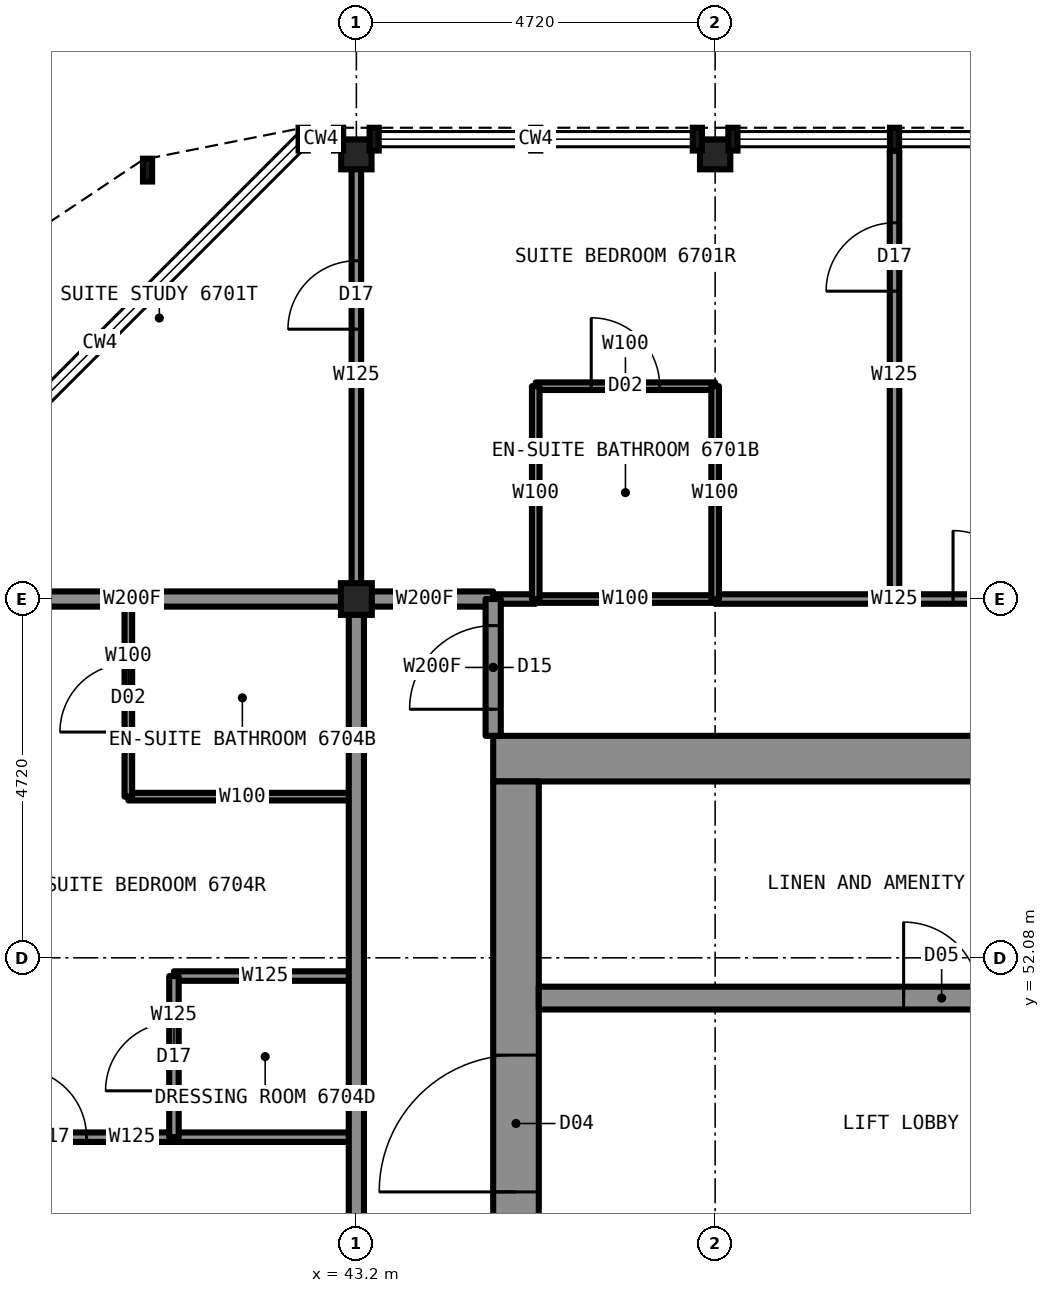
"""IFC4 building model, lengths in metres.
Left out: names, types, materials, properties, quantities, classifications, styles, units other than length and angle.
Written with IfcOpenShell. Run it as: python <this file> out.ifc"""

import sys

from ifc_helpers import new_model, si_unit, direction, frame, frame_2d, origin, origin_2d, place, context, subcontext, project, spatial, rectangle, i_section, extrude, element, fill, save


model = new_model("IFC4")
c1 = context("Model", 3, precision=1e-05, world=origin(), true_north=direction((0.0, 1.0)))
c2 = subcontext(c1, "Body", "Model", "MODEL_VIEW")
j1 = project(units=[si_unit("LENGTHUNIT", "METRE"), si_unit("PLANEANGLEUNIT", "RADIAN")], contexts=[c1])
p1 = place(None, origin())
s1 = spatial("IfcSite", under=j1, at=p1, CompositionType="ELEMENT")
p2 = place(p1, origin())
s2 = spatial("IfcBuilding", under=s1, at=p2, CompositionType="ELEMENT")
p3 = place(p2, frame((0.0, 0.0, 247.7)))
s3 = spatial("IfcBuildingStorey", under=s2, at=p3, CompositionType="ELEMENT", Elevation=247.7)
for number, where, z_axis, x_axis in (
    (1, (43.2, 62.65, 0.0), (0.0, 0.0, 1.0), (1.0, 0.0, 0.0)),
    (2, (47.92, 62.65, 0.0), (0.0, 0.0, 1.0), (1.0, 0.0, 0.0)),
):
    element("IfcColumn", number, at=place(p3, frame(where, z_axis=z_axis, x_axis=x_axis)), inside=s3, PredefinedType="COLUMN", context=c2, shape_type="SweptSolid", body=[
        extrude(i_section(OverallWidth=0.399, OverallDepth=0.394, WebThickness=0.023, FlangeThickness=0.037, at=origin_2d()), origin(), (0.0, 0.0, 1.0), 3.5),
    ])
p4 = place(p3, frame((43.2, 56.8, 0.0), z_axis=(0.0, 0.0, 1.0), x_axis=(1.0, 0.0, 0.0)))
e3 = element("IfcColumn", 3, at=p4, inside=s3, PredefinedType="COLUMN", context=c2, shape_type="SweptSolid", body=[
    extrude(i_section(OverallWidth=0.406, OverallDepth=0.417, WebThickness=0.03, FlangeThickness=0.048, at=origin_2d()), origin(), (0.0, 0.0, 1.0), 3.5),
])
p5 = place(p3, frame((45.0, 54.7, 0.0), z_axis=(0.0, 0.0, 1.0), x_axis=(1.0, 0.0, 0.0)))
e4 = element("IfcWall", 4, at=p5, inside=s3, PredefinedType="SHEAR", context=c2, shape_type="SweptSolid", body=[
    extrude(rectangle(XDim=20.0, YDim=0.6, at=frame_2d((10.0, 0.0))), origin(), (0.0, 0.0, 1.0), 3.5),
])
p6 = place(p3, frame((45.3, 35.6, 0.0), z_axis=(0.0, 0.0, 1.0), x_axis=(0.0, 1.0, 0.0)))
e5 = element("IfcWall", 5, at=p6, inside=s3, PredefinedType="SHEAR", context=c2, shape_type="SweptSolid", body=[
    extrude(rectangle(XDim=18.8, YDim=0.6, at=frame_2d((9.4, 0.0))), origin(), (0.0, 0.0, 1.0), 3.5),
])
p7 = place(p6, frame((13.4, 0.0, 0.0)))
e6 = element("IfcOpeningElement", 6, at=p7, cuts=e5, PredefinedType="OPENING", context=c2, shape_type="SweptSolid", body=[
    extrude(rectangle(XDim=1.8, YDim=2.2, at=frame_2d((0.9, 1.1))), frame((0.0, 0.31, 0.0), z_axis=(0.0, -1.0, 0.0), x_axis=(1.0, 0.0, 0.0)), (0.0, 0.0, 1.0), 0.62),
])
p8 = place(p6, frame((3.6, 0.0, 0.0)))
e7 = element("IfcOpeningElement", 7, at=p8, cuts=e5, PredefinedType="OPENING", context=c2, shape_type="SweptSolid", body=[
    extrude(rectangle(XDim=1.8, YDim=2.2, at=frame_2d((0.9, 1.1))), frame((0.0, 0.31, 0.0), z_axis=(0.0, -1.0, 0.0), x_axis=(1.0, 0.0, 0.0)), (0.0, 0.0, 1.0), 0.62),
])
p9 = place(p6, frame((6.4, 0.0, 0.0)))
e8 = element("IfcOpeningElement", 8, at=p9, cuts=e5, PredefinedType="OPENING", context=c2, shape_type="SweptSolid", body=[
    extrude(rectangle(XDim=1.2, YDim=2.2, at=frame_2d((0.6, 1.1))), frame((0.0, 0.31, 0.0), z_axis=(0.0, -1.0, 0.0), x_axis=(1.0, 0.0, 0.0)), (0.0, 0.0, 1.0), 0.62),
])
p10 = place(p3, frame((45.6, 51.55, 0.0), z_axis=(0.0, 0.0, 1.0), x_axis=(1.0, 0.0, 0.0)))
e9 = element("IfcWall", 9, at=p10, inside=s3, PredefinedType="SHEAR", context=c2, shape_type="SweptSolid", body=[
    extrude(rectangle(XDim=18.8, YDim=0.3, at=frame_2d((9.4, 0.0))), origin(), (0.0, 0.0, 1.0), 3.5),
])
p11 = place(p10, frame((4.8, 0.0, 0.0)))
e10 = element("IfcOpeningElement", 10, at=p11, cuts=e9, PredefinedType="OPENING", context=c2, shape_type="SweptSolid", body=[
    extrude(rectangle(XDim=1.0, YDim=2.1, at=frame_2d((0.5, 1.05))), frame((0.0, 0.16, 0.0), z_axis=(0.0, -1.0, 0.0), x_axis=(1.0, 0.0, 0.0)), (0.0, 0.0, 1.0), 0.32),
])
p12 = place(p10, frame((11.6, 0.0, 0.0)))
e11 = element("IfcOpeningElement", 11, at=p12, cuts=e9, PredefinedType="OPENING", context=c2, shape_type="SweptSolid", body=[
    extrude(rectangle(XDim=1.1, YDim=2.2, at=frame_2d((0.55, 1.1))), frame((0.0, 0.16, 0.0), z_axis=(0.0, -1.0, 0.0), x_axis=(1.0, 0.0, 0.0)), (0.0, 0.0, 1.0), 0.32),
])
p13 = place(p10, frame((14.3, 0.0, 0.0)))
e12 = element("IfcOpeningElement", 12, at=p13, cuts=e9, PredefinedType="OPENING", context=c2, shape_type="SweptSolid", body=[
    extrude(rectangle(XDim=1.1, YDim=2.2, at=frame_2d((0.55, 1.1))), frame((0.0, 0.16, 0.0), z_axis=(0.0, -1.0, 0.0), x_axis=(1.0, 0.0, 0.0)), (0.0, 0.0, 1.0), 0.32),
])
p14 = place(p3, frame((45.56, 56.8, 0.0), z_axis=(0.0, 0.0, 1.0), x_axis=(1.0, 0.0, 0.0)))
e13 = element("IfcWall", 13, at=p14, inside=s3, PredefinedType="PARTITIONING", context=c2, shape_type="SweptSolid", body=[
    extrude(rectangle(XDim=2.36, YDim=0.1, at=frame_2d((1.18, 0.0))), origin(), (0.0, 0.0, 1.0), 3.33),
])
p15 = place(p3, frame((43.2, 56.8, 0.0), z_axis=(0.0, 0.0, 1.0), x_axis=(1.0, 0.0, 0.0)))
e14 = element("IfcWall", 14, at=p15, inside=s3, PredefinedType="PARTITIONING", context=c2, shape_type="SweptSolid", body=[
    extrude(rectangle(XDim=1.8, YDim=0.2, at=frame_2d((0.9, 0.0))), origin(), (0.0, 0.0, 1.0), 3.33),
])
p16 = place(p3, frame((37.3, 56.8, 0.0), z_axis=(0.0, 0.0, 1.0), x_axis=(1.0, 0.0, 0.0)))
e15 = element("IfcWall", 15, at=p16, inside=s3, PredefinedType="PARTITIONING", context=c2, shape_type="SweptSolid", body=[
    extrude(rectangle(XDim=5.9, YDim=0.2, at=frame_2d((2.95, 0.0))), origin(), (0.0, 0.0, 1.0), 2.573),
])
p17 = place(p3, frame((45.0, 56.8, 0.0), z_axis=(0.0, 0.0, 1.0), x_axis=(1.0, 0.0, 0.0)))
e16 = element("IfcWall", 16, at=p17, inside=s3, PredefinedType="PARTITIONING", context=c2, shape_type="SweptSolid", body=[
    extrude(rectangle(XDim=0.56, YDim=0.125, at=frame_2d((0.28, 0.0))), origin(), (0.0, 0.0, 1.0), 3.33),
])
p18 = place(p3, frame((47.92, 56.8, 0.0), z_axis=(0.0, 0.0, 1.0), x_axis=(1.0, 0.0, 0.0)))
e17 = element("IfcWall", 17, at=p18, inside=s3, PredefinedType="PARTITIONING", context=c2, shape_type="SweptSolid", body=[
    extrude(rectangle(XDim=4.72, YDim=0.125, at=frame_2d((2.36, 0.0))), origin(), (0.0, 0.0, 1.0), 3.33),
])
p19 = place(p18, frame((3.13, 0.0, 0.0)))
e18 = element("IfcOpeningElement", 18, at=p19, cuts=e17, PredefinedType="OPENING", context=c2, shape_type="SweptSolid", body=[
    extrude(rectangle(XDim=0.9, YDim=2.2, at=frame_2d((0.45, 1.1))), frame((0.0, 0.073, 0.0), z_axis=(0.0, -1.0, 0.0), x_axis=(1.0, 0.0, 0.0)), (0.0, 0.0, 1.0), 0.145),
])
p20 = place(p3, frame((45.56, 59.6, 0.0), z_axis=(0.0, 0.0, 1.0), x_axis=(1.0, 0.0, 0.0)))
e19 = element("IfcWall", 19, at=p20, inside=s3, PredefinedType="PARTITIONING", context=c2, shape_type="SweptSolid", body=[
    extrude(rectangle(XDim=2.36, YDim=0.1, at=frame_2d((1.18, 0.0))), origin(), (0.0, 0.0, 1.0), 3.33),
])
p21 = place(p20, frame((0.73, 0.0, 0.0)))
e20 = element("IfcOpeningElement", 20, at=p21, cuts=e19, PredefinedType="OPENING", context=c2, shape_type="SweptSolid", body=[
    extrude(rectangle(XDim=0.9, YDim=2.1, at=frame_2d((0.45, 1.05))), frame((0.0, 0.06, 0.0), z_axis=(0.0, -1.0, 0.0), x_axis=(1.0, 0.0, 0.0)), (0.0, 0.0, 1.0), 0.12),
])
p22 = place(p3, frame((37.3, 49.72, 0.0), z_axis=(0.0, 0.0, 1.0), x_axis=(1.0, 0.0, 0.0)))
e21 = element("IfcWall", 21, at=p22, inside=s3, PredefinedType="PARTITIONING", context=c2, shape_type="SweptSolid", body=[
    extrude(rectangle(XDim=5.9, YDim=0.125, at=frame_2d((2.95, 0.0))), origin(), (0.0, 0.0, 1.0), 2.797),
])
p23 = place(p22, frame((1.45, 0.0, 0.0)))
e22 = element("IfcOpeningElement", 22, at=p23, cuts=e21, PredefinedType="OPENING", context=c2, shape_type="SweptSolid", body=[
    extrude(rectangle(XDim=0.9, YDim=2.2, at=frame_2d((0.45, 1.1))), frame((0.0, 0.073, 0.0), z_axis=(0.0, -1.0, 0.0), x_axis=(1.0, 0.0, 0.0)), (0.0, 0.0, 1.0), 0.145),
])
p24 = place(p3, frame((40.8, 51.84, 0.0), z_axis=(0.0, 0.0, 1.0), x_axis=(1.0, 0.0, 0.0)))
e23 = element("IfcWall", 23, at=p24, inside=s3, PredefinedType="PARTITIONING", context=c2, shape_type="SweptSolid", body=[
    extrude(rectangle(XDim=2.4, YDim=0.125, at=frame_2d((1.2, 0.0))), origin(), (0.0, 0.0, 1.0), 3.33),
])
p25 = place(p3, frame((40.2, 54.2, 0.0), z_axis=(0.0, 0.0, 1.0), x_axis=(1.0, 0.0, 0.0)))
e24 = element("IfcWall", 24, at=p25, inside=s3, PredefinedType="PARTITIONING", context=c2, shape_type="SweptSolid", body=[
    extrude(rectangle(XDim=3.0, YDim=0.1, at=frame_2d((1.5, 0.0))), origin(), (0.0, 0.0, 1.0), 3.33),
])
p26 = place(p3, frame((45.0, 55.0, 0.0), z_axis=(0.0, 0.0, 1.0), x_axis=(0.0, 1.0, 0.0)))
e25 = element("IfcWall", 25, at=p26, inside=s3, PredefinedType="PARTITIONING", context=c2, shape_type="SweptSolid", body=[
    extrude(rectangle(XDim=1.8, YDim=0.2, at=frame_2d((0.9, 0.0))), origin(), (0.0, 0.0, 1.0), 3.33),
])
p27 = place(p26, frame((0.35, 0.0, 0.0)))
e26 = element("IfcOpeningElement", 26, at=p27, cuts=e25, PredefinedType="OPENING", context=c2, shape_type="SweptSolid", body=[
    extrude(rectangle(XDim=1.1, YDim=2.2, at=frame_2d((0.55, 1.1))), frame((0.0, 0.11, 0.0), z_axis=(0.0, -1.0, 0.0), x_axis=(1.0, 0.0, 0.0)), (0.0, 0.0, 1.0), 0.22),
])
p28 = place(p3, frame((43.2, 33.2, 0.0), z_axis=(0.0, 0.0, 1.0), x_axis=(0.0, 1.0, 0.0)))
e27 = element("IfcWall", 27, at=p28, inside=s3, PredefinedType="PARTITIONING", context=c2, shape_type="SweptSolid", body=[
    extrude(rectangle(XDim=23.6, YDim=0.2, at=frame_2d((11.8, 0.0))), origin(), (0.0, 0.0, 1.0), 3.33),
])
p29 = place(p28, frame((8.95, 0.0, 0.0)))
e28 = element("IfcOpeningElement", 28, at=p29, cuts=e27, PredefinedType="OPENING", context=c2, shape_type="SweptSolid", body=[
    extrude(rectangle(XDim=1.1, YDim=2.2, at=frame_2d((0.55, 1.1))), frame((0.0, 0.11, 0.0), z_axis=(0.0, -1.0, 0.0), x_axis=(1.0, 0.0, 0.0)), (0.0, 0.0, 1.0), 0.22),
])
p30 = place(p28, frame((0.7, 0.0, 0.0)))
e29 = element("IfcOpeningElement", 29, at=p30, cuts=e27, PredefinedType="OPENING", context=c2, shape_type="SweptSolid", body=[
    extrude(rectangle(XDim=1.0, YDim=2.1, at=frame_2d((0.5, 1.05))), frame((0.0, 0.11, 0.0), z_axis=(0.0, -1.0, 0.0), x_axis=(1.0, 0.0, 0.0)), (0.0, 0.0, 1.0), 0.22),
])
p31 = place(p3, frame((43.2, 56.8, 0.0), z_axis=(0.0, 0.0, 1.0), x_axis=(0.0, 1.0, 0.0)))
e30 = element("IfcWall", 30, at=p31, inside=s3, PredefinedType="PARTITIONING", context=c2, shape_type="SweptSolid", body=[
    extrude(rectangle(XDim=5.9, YDim=0.125, at=frame_2d((2.95, 0.0))), origin(), (0.0, 0.0, 1.0), 2.573),
])
p32 = place(p31, frame((3.55, 0.0, 0.0)))
e31 = element("IfcOpeningElement", 31, at=p32, cuts=e30, PredefinedType="OPENING", context=c2, shape_type="SweptSolid", body=[
    extrude(rectangle(XDim=0.9, YDim=2.2, at=frame_2d((0.45, 1.1))), frame((0.0, 0.073, 0.0), z_axis=(0.0, -1.0, 0.0), x_axis=(1.0, 0.0, 0.0)), (0.0, 0.0, 1.0), 0.145),
])
p33 = place(p3, frame((40.8, 49.72, 0.0), z_axis=(0.0, 0.0, 1.0), x_axis=(0.0, 1.0, 0.0)))
e32 = element("IfcWall", 32, at=p33, inside=s3, PredefinedType="PARTITIONING", context=c2, shape_type="SweptSolid", body=[
    extrude(rectangle(XDim=2.12, YDim=0.125, at=frame_2d((1.06, 0.0))), origin(), (0.0, 0.0, 1.0), 3.33),
])
p34 = place(p33, frame((0.61, 0.0, 0.0)))
e33 = element("IfcOpeningElement", 33, at=p34, cuts=e32, PredefinedType="OPENING", context=c2, shape_type="SweptSolid", body=[
    extrude(rectangle(XDim=0.9, YDim=2.2, at=frame_2d((0.45, 1.1))), frame((0.0, 0.073, 0.0), z_axis=(0.0, -1.0, 0.0), x_axis=(1.0, 0.0, 0.0)), (0.0, 0.0, 1.0), 0.145),
])
p35 = place(p3, frame((40.2, 54.2, 0.0), z_axis=(0.0, 0.0, 1.0), x_axis=(0.0, 1.0, 0.0)))
e34 = element("IfcWall", 34, at=p35, inside=s3, PredefinedType="PARTITIONING", context=c2, shape_type="SweptSolid", body=[
    extrude(rectangle(XDim=2.6, YDim=0.1, at=frame_2d((1.3, 0.0))), origin(), (0.0, 0.0, 1.0), 3.33),
])
p36 = place(p35, frame((0.85, 0.0, 0.0)))
e35 = element("IfcOpeningElement", 35, at=p36, cuts=e34, PredefinedType="OPENING", context=c2, shape_type="SweptSolid", body=[
    extrude(rectangle(XDim=0.9, YDim=2.1, at=frame_2d((0.45, 1.05))), frame((0.0, 0.06, 0.0), z_axis=(0.0, -1.0, 0.0), x_axis=(1.0, 0.0, 0.0)), (0.0, 0.0, 1.0), 0.12),
])
p37 = place(p3, frame((50.28, 56.8, 0.0), z_axis=(0.0, 0.0, 1.0), x_axis=(0.0, 1.0, 0.0)))
e36 = element("IfcWall", 36, at=p37, inside=s3, PredefinedType="PARTITIONING", context=c2, shape_type="SweptSolid", body=[
    extrude(rectangle(XDim=5.9, YDim=0.125, at=frame_2d((2.95, 0.0))), origin(), (0.0, 0.0, 1.0), 3.33),
])
p38 = place(p37, frame((4.05, 0.0, 0.0)))
e37 = element("IfcOpeningElement", 37, at=p38, cuts=e36, PredefinedType="OPENING", context=c2, shape_type="SweptSolid", body=[
    extrude(rectangle(XDim=0.9, YDim=2.2, at=frame_2d((0.45, 1.1))), frame((0.0, 0.073, 0.0), z_axis=(0.0, -1.0, 0.0), x_axis=(1.0, 0.0, 0.0)), (0.0, 0.0, 1.0), 0.145),
])
p39 = place(p3, frame((47.92, 56.8, 0.0), z_axis=(0.0, 0.0, 1.0), x_axis=(0.0, 1.0, 0.0)))
e38 = element("IfcWall", 38, at=p39, inside=s3, PredefinedType="PARTITIONING", context=c2, shape_type="SweptSolid", body=[
    extrude(rectangle(XDim=2.8, YDim=0.1, at=frame_2d((1.4, 0.0))), origin(), (0.0, 0.0, 1.0), 2.573),
])
p40 = place(p3, frame((45.56, 56.8, 0.0), z_axis=(0.0, 0.0, 1.0), x_axis=(0.0, 1.0, 0.0)))
e39 = element("IfcWall", 39, at=p40, inside=s3, PredefinedType="PARTITIONING", context=c2, shape_type="SweptSolid", body=[
    extrude(rectangle(XDim=2.8, YDim=0.1, at=frame_2d((1.4, 0.0))), origin(), (0.0, 0.0, 1.0), 3.33),
])
p41 = place(p19, origin())
e40 = element("IfcDoor", 40, at=p41, inside=s3, OperationType="SINGLE_SWING_LEFT", PredefinedType="DOOR", context=c2, shape_type="SweptSolid", body=[
    extrude(rectangle(XDim=0.9, YDim=2.2, at=frame_2d((0.45, 1.1))), frame((0.0, 0.025, 0.0), z_axis=(0.0, -1.0, 0.0), x_axis=(1.0, 0.0, 0.0)), (0.0, 0.0, 1.0), 0.05),
])
fill(e18, e40)
p42 = place(p21, origin())
e41 = element("IfcDoor", 41, at=p42, inside=s3, OperationType="SINGLE_SWING_RIGHT", PredefinedType="DOOR", context=c2, shape_type="SweptSolid", body=[
    extrude(rectangle(XDim=0.9, YDim=2.1, at=frame_2d((0.45, 1.05))), frame((0.0, 0.025, 0.0), z_axis=(0.0, -1.0, 0.0), x_axis=(1.0, 0.0, 0.0)), (0.0, 0.0, 1.0), 0.05),
])
fill(e20, e41)
p43 = place(p27, origin())
e42 = element("IfcDoor", 42, at=p43, inside=s3, OperationType="SINGLE_SWING_LEFT", PredefinedType="DOOR", context=c2, shape_type="SweptSolid", body=[
    extrude(rectangle(XDim=1.1, YDim=2.2, at=frame_2d((0.55, 1.1))), frame((0.0, 0.025, 0.0), z_axis=(0.0, -1.0, 0.0), x_axis=(1.0, 0.0, 0.0)), (0.0, 0.0, 1.0), 0.05),
])
fill(e26, e42)
p44 = place(p38, origin())
e43 = element("IfcDoor", 43, at=p44, inside=s3, OperationType="SINGLE_SWING_LEFT", PredefinedType="DOOR", context=c2, shape_type="SweptSolid", body=[
    extrude(rectangle(XDim=0.9, YDim=2.2, at=frame_2d((0.45, 1.1))), frame((0.0, 0.025, 0.0), z_axis=(0.0, -1.0, 0.0), x_axis=(1.0, 0.0, 0.0)), (0.0, 0.0, 1.0), 0.05),
])
fill(e37, e43)
p45 = place(p32, origin())
e44 = element("IfcDoor", 44, at=p45, inside=s3, OperationType="SINGLE_SWING_LEFT", PredefinedType="DOOR", context=c2, shape_type="SweptSolid", body=[
    extrude(rectangle(XDim=0.9, YDim=2.2, at=frame_2d((0.45, 1.1))), frame((0.0, 0.025, 0.0), z_axis=(0.0, -1.0, 0.0), x_axis=(1.0, 0.0, 0.0)), (0.0, 0.0, 1.0), 0.05),
])
fill(e31, e44)
p46 = place(p36, origin())
e45 = element("IfcDoor", 45, at=p46, inside=s3, OperationType="SINGLE_SWING_RIGHT", PredefinedType="DOOR", context=c2, shape_type="SweptSolid", body=[
    extrude(rectangle(XDim=0.9, YDim=2.1, at=frame_2d((0.45, 1.05))), frame((0.0, 0.025, 0.0), z_axis=(0.0, -1.0, 0.0), x_axis=(1.0, 0.0, 0.0)), (0.0, 0.0, 1.0), 0.05),
])
fill(e35, e45)
p47 = place(p34, origin())
e46 = element("IfcDoor", 46, at=p47, inside=s3, OperationType="SINGLE_SWING_LEFT", PredefinedType="DOOR", context=c2, shape_type="SweptSolid", body=[
    extrude(rectangle(XDim=0.9, YDim=2.2, at=frame_2d((0.45, 1.1))), frame((0.0, 0.025, 0.0), z_axis=(0.0, -1.0, 0.0), x_axis=(1.0, 0.0, 0.0)), (0.0, 0.0, 1.0), 0.05),
])
fill(e33, e46)
p48 = place(p23, origin())
e47 = element("IfcDoor", 47, at=p48, inside=s3, OperationType="SINGLE_SWING_LEFT", PredefinedType="DOOR", context=c2, shape_type="SweptSolid", body=[
    extrude(rectangle(XDim=0.9, YDim=2.2, at=frame_2d((0.45, 1.1))), frame((0.0, 0.025, 0.0), z_axis=(0.0, -1.0, 0.0), x_axis=(1.0, 0.0, 0.0)), (0.0, 0.0, 1.0), 0.05),
])
fill(e22, e47)
p49 = place(p7, origin())
e48 = element("IfcDoor", 48, at=p49, inside=s3, OperationType="DOUBLE_DOOR_SINGLE_SWING", PredefinedType="DOOR", context=c2, shape_type="SweptSolid", body=[
    extrude(rectangle(XDim=1.8, YDim=2.2, at=frame_2d((0.9, 1.1))), frame((0.0, 0.025, 0.0), z_axis=(0.0, -1.0, 0.0), x_axis=(1.0, 0.0, 0.0)), (0.0, 0.0, 1.0), 0.05),
])
fill(e6, e48)
p50 = place(p11, origin())
e49 = element("IfcDoor", 49, at=p50, inside=s3, OperationType="SINGLE_SWING_LEFT", PredefinedType="DOOR", context=c2, shape_type="SweptSolid", body=[
    extrude(rectangle(XDim=1.0, YDim=2.1, at=frame_2d((0.5, 1.05))), frame((0.0, 0.025, 0.0), z_axis=(0.0, -1.0, 0.0), x_axis=(1.0, 0.0, 0.0)), (0.0, 0.0, 1.0), 0.05),
])
fill(e10, e49)
save(model, sys.argv[1])
